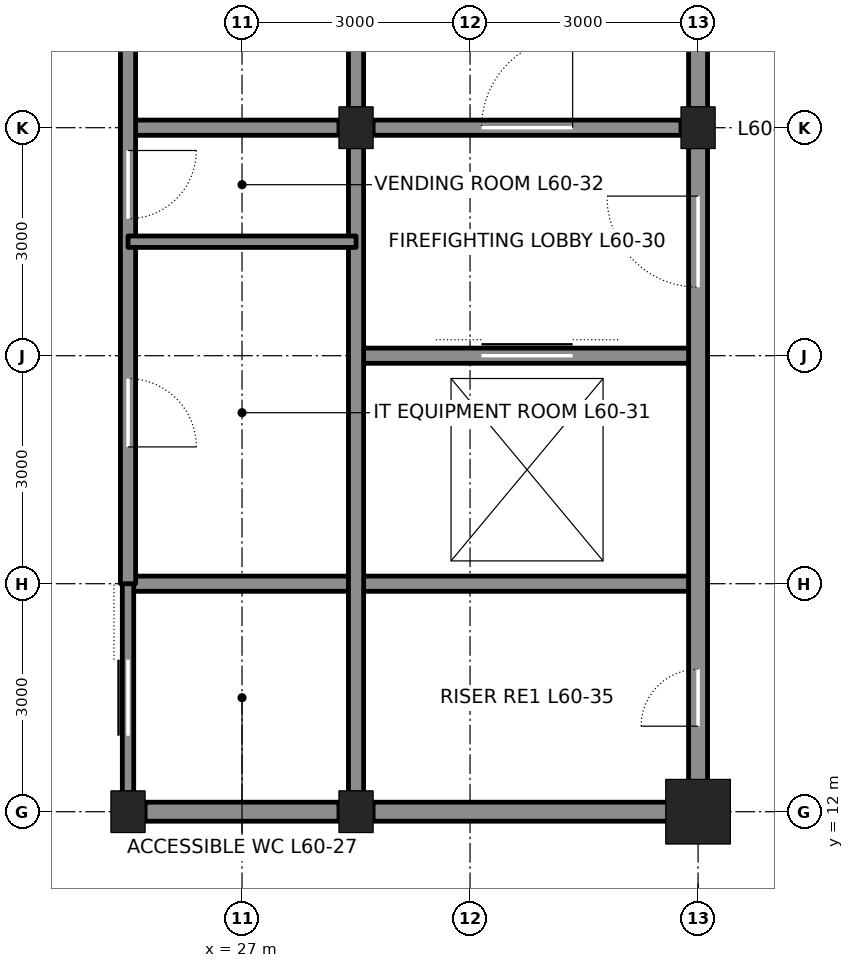
"""IFC4 building model, lengths in metres.
Left out: names, types, materials, properties, quantities, classifications, styles, units other than length and angle.
Written with IfcOpenShell. Run it as: python <this file> out.ifc"""

import sys

from ifc_helpers import new_model, si_unit, direction, frame, frame_2d, origin, origin_2d, place, context, subcontext, project, spatial, rectangle, hollow_rectangle, i_section, extrude, element, fill, save


model = new_model("IFC4")
c1 = context("Model", 3, precision=1e-05, world=origin(), true_north=direction((0.0, 1.0)))
c2 = subcontext(c1, "Body", "Model", "MODEL_VIEW")
j1 = project(units=[si_unit("LENGTHUNIT", "METRE"), si_unit("PLANEANGLEUNIT", "RADIAN")], contexts=[c1])
p1 = place(None, origin())
s1 = spatial("IfcSite", under=j1, at=p1, CompositionType="ELEMENT")
p2 = place(p1, origin())
s2 = spatial("IfcBuilding", under=s1, at=p2, CompositionType="ELEMENT")
p3 = place(p2, frame((0.0, 0.0, 270.6)))
s3 = spatial("IfcBuildingStorey", under=s2, at=p3, CompositionType="ELEMENT", Elevation=270.6)
for number, where, z_axis, x_axis in (
    (1, (25.5, 12.0, 0.0), (0.0, 0.0, 1.0), (1.0, 0.0, 0.0)),
    (2, (28.5, 12.0, 0.0), (0.0, 0.0, 1.0), (1.0, 0.0, 0.0)),
):
    element("IfcColumn", number, at=place(p3, frame(where, z_axis=z_axis, x_axis=x_axis)), inside=s3, PredefinedType="COLUMN", context=c2, shape_type="SweptSolid", body=[
        extrude(i_section(OverallWidth=0.449, OverallDepth=0.549, WebThickness=0.072, FlangeThickness=0.115, at=origin_2d()), origin(), (0.0, 0.0, 1.0), 4.2),
    ])
p4 = place(p3, frame((33.0, 12.0, 0.0), z_axis=(0.0, 0.0, 1.0), x_axis=(1.0, 0.0, 0.0)))
e3 = element("IfcColumn", 3, at=p4, inside=s3, PredefinedType="COLUMN", context=c2, shape_type="SweptSolid", body=[
    extrude(hollow_rectangle(XDim=0.85, YDim=0.85, WallThickness=0.085, at=origin_2d()), origin(), (0.0, 0.0, 1.0), 4.2),
])
for number, where, z_axis, x_axis in (
    (4, (33.0, 21.0, 0.0), (0.0, 0.0, 1.0), (1.0, 0.0, 0.0)),
    (5, (28.5, 21.0, 0.0), (0.0, 0.0, 1.0), (1.0, 0.0, 0.0)),
):
    element("IfcColumn", number, at=place(p3, frame(where, z_axis=z_axis, x_axis=x_axis)), inside=s3, PredefinedType="COLUMN", context=c2, shape_type="SweptSolid", body=[
        extrude(i_section(OverallWidth=0.449, OverallDepth=0.549, WebThickness=0.072, FlangeThickness=0.115, at=origin_2d()), origin(), (0.0, 0.0, 1.0), 4.2),
    ])
p5 = place(p3, frame((25.725, 12.0, 0.0), z_axis=(0.0, 0.0, 1.0), x_axis=(1.0, 0.0, 0.0)))
e6 = element("IfcWall", 6, at=p5, inside=s3, PredefinedType="SOLIDWALL", context=c2, shape_type="SweptSolid", body=[
    extrude(rectangle(XDim=2.55, YDim=0.25, at=frame_2d((1.275, 0.0))), origin(), (0.0, 0.0, 1.0), 3.181),
])
p6 = place(p3, frame((28.725, 12.0, 0.0), z_axis=(0.0, 0.0, 1.0), x_axis=(1.0, 0.0, 0.0)))
e7 = element("IfcWall", 7, at=p6, inside=s3, PredefinedType="SOLIDWALL", context=c2, shape_type="SweptSolid", body=[
    extrude(rectangle(XDim=4.025, YDim=0.25, at=frame_2d((2.013, 0.0))), origin(), (0.0, 0.0, 1.0), 3.181),
])
p7 = place(p3, frame((25.5, 15.0, 0.0), z_axis=(0.0, 0.0, 1.0), x_axis=(1.0, 0.0, 0.0)))
e8 = element("IfcWall", 8, at=p7, inside=s3, PredefinedType="SOLIDWALL", context=c2, shape_type="SweptSolid", body=[
    extrude(rectangle(XDim=7.5, YDim=0.2, at=frame_2d((3.75, 0.0))), origin(), (0.0, 0.0, 1.0), 4.04),
])
p8 = place(p3, frame((28.5, 18.0, 0.0), z_axis=(0.0, 0.0, 1.0), x_axis=(1.0, 0.0, 0.0)))
e9 = element("IfcWall", 9, at=p8, inside=s3, PredefinedType="SOLIDWALL", context=c2, shape_type="SweptSolid", body=[
    extrude(rectangle(XDim=4.5, YDim=0.2, at=frame_2d((2.25, 0.0))), origin(), (0.0, 0.0, 1.0), 4.04),
])
p9 = place(p8, frame((1.65, 0.0, 0.0)))
e10 = element("IfcOpeningElement", 10, at=p9, cuts=e9, PredefinedType="OPENING", context=c2, shape_type="SweptSolid", body=[
    extrude(rectangle(XDim=1.2, YDim=2.1, at=frame_2d((0.6, 1.05))), frame((0.0, 0.11, 0.0), z_axis=(0.0, -1.0, 0.0), x_axis=(1.0, 0.0, 0.0)), (0.0, 0.0, 1.0), 0.22),
])
p10 = place(p3, frame((25.5, 21.0, 0.0), z_axis=(0.0, 0.0, 1.0), x_axis=(1.0, 0.0, 0.0)))
e11 = element("IfcWall", 11, at=p10, inside=s3, PredefinedType="SOLIDWALL", context=c2, shape_type="SweptSolid", body=[
    extrude(rectangle(XDim=2.775, YDim=0.2, at=frame_2d((1.388, 0.0))), origin(), (0.0, 0.0, 1.0), 3.09),
])
p11 = place(p3, frame((28.725, 21.0, 0.0), z_axis=(0.0, 0.0, 1.0), x_axis=(1.0, 0.0, 0.0)))
e12 = element("IfcWall", 12, at=p11, inside=s3, PredefinedType="SOLIDWALL", context=c2, shape_type="SweptSolid", body=[
    extrude(rectangle(XDim=4.05, YDim=0.2, at=frame_2d((2.025, 0.0))), origin(), (0.0, 0.0, 1.0), 3.09),
])
p12 = place(p11, frame((1.425, 0.0, 0.0)))
e13 = element("IfcOpeningElement", 13, at=p12, cuts=e12, PredefinedType="OPENING", context=c2, shape_type="SweptSolid", body=[
    extrude(rectangle(XDim=1.2, YDim=2.1, at=frame_2d((0.6, 1.05))), frame((0.0, 0.11, 0.0), z_axis=(0.0, -1.0, 0.0), x_axis=(1.0, 0.0, 0.0)), (0.0, 0.0, 1.0), 0.22),
])
p13 = place(p3, frame((25.5, 12.25, 0.0), z_axis=(0.0, 0.0, 1.0), x_axis=(0.0, 1.0, 0.0)))
e14 = element("IfcWall", 14, at=p13, inside=s3, PredefinedType="PARTITIONING", context=c2, shape_type="SweptSolid", body=[
    extrude(rectangle(XDim=2.75, YDim=0.15, at=frame_2d((1.375, 0.0))), origin(), (0.0, 0.0, 1.0), 3.064),
])
p14 = place(p13, frame((0.75, 0.0, 0.0)))
e15 = element("IfcOpeningElement", 15, at=p14, cuts=e14, PredefinedType="OPENING", context=c2, shape_type="SweptSolid", body=[
    extrude(rectangle(XDim=1.0, YDim=2.1, at=frame_2d((0.5, 1.05))), frame((0.0, 0.085, 0.0), z_axis=(0.0, -1.0, 0.0), x_axis=(1.0, 0.0, 0.0)), (0.0, 0.0, 1.0), 0.17),
])
p15 = place(p3, frame((25.5, 15.0, 0.0), z_axis=(0.0, 0.0, 1.0), x_axis=(0.0, 1.0, 0.0)))
e16 = element("IfcWall", 16, at=p15, inside=s3, PredefinedType="SOLIDWALL", context=c2, shape_type="SweptSolid", body=[
    extrude(rectangle(XDim=12.0, YDim=0.2, at=frame_2d((6.0, 0.0))), origin(), (0.0, 0.0, 1.0), 3.064),
])
p16 = place(p15, frame((1.8, 0.0, 0.0)))
e17 = element("IfcOpeningElement", 17, at=p16, cuts=e16, PredefinedType="OPENING", context=c2, shape_type="SweptSolid", body=[
    extrude(rectangle(XDim=0.9, YDim=2.1, at=frame_2d((0.45, 1.05))), frame((0.0, 0.11, 0.0), z_axis=(0.0, -1.0, 0.0), x_axis=(1.0, 0.0, 0.0)), (0.0, 0.0, 1.0), 0.22),
])
p17 = place(p15, frame((4.8, 0.0, 0.0)))
e18 = element("IfcOpeningElement", 18, at=p17, cuts=e16, PredefinedType="OPENING", context=c2, shape_type="SweptSolid", body=[
    extrude(rectangle(XDim=0.9, YDim=2.1, at=frame_2d((0.45, 1.05))), frame((0.0, 0.11, 0.0), z_axis=(0.0, -1.0, 0.0), x_axis=(1.0, 0.0, 0.0)), (0.0, 0.0, 1.0), 0.22),
])
p18 = place(p3, frame((28.5, 12.25, 0.0), z_axis=(0.0, 0.0, 1.0), x_axis=(0.0, 1.0, 0.0)))
e19 = element("IfcWall", 19, at=p18, inside=s3, PredefinedType="SOLIDWALL", context=c2, shape_type="SweptSolid", body=[
    extrude(rectangle(XDim=8.5, YDim=0.2, at=frame_2d((4.25, 0.0))), origin(), (0.0, 0.0, 1.0), 3.113),
])
p19 = place(p3, frame((28.5, 21.25, 0.0), z_axis=(0.0, 0.0, 1.0), x_axis=(0.0, 1.0, 0.0)))
e20 = element("IfcWall", 20, at=p19, inside=s3, PredefinedType="SOLIDWALL", context=c2, shape_type="SweptSolid", body=[
    extrude(rectangle(XDim=2.5, YDim=0.2, at=frame_2d((1.25, 0.0))), origin(), (0.0, 0.0, 1.0), 3.113),
])
p20 = place(p3, frame((33.0, 12.25, 0.0), z_axis=(0.0, 0.0, 1.0), x_axis=(0.0, 1.0, 0.0)))
e21 = element("IfcWall", 21, at=p20, inside=s3, PredefinedType="SOLIDWALL", context=c2, shape_type="SweptSolid", body=[
    extrude(rectangle(XDim=8.5, YDim=0.25, at=frame_2d((4.25, 0.0))), origin(), (0.0, 0.0, 1.0), 3.113),
])
p21 = place(p20, frame((6.65, 0.0, 0.0)))
e22 = element("IfcOpeningElement", 22, at=p21, cuts=e21, PredefinedType="OPENING", context=c2, shape_type="SweptSolid", body=[
    extrude(rectangle(XDim=1.2, YDim=2.1, at=frame_2d((0.6, 1.05))), frame((0.0, 0.135, 0.0), z_axis=(0.0, -1.0, 0.0), x_axis=(1.0, 0.0, 0.0)), (0.0, 0.0, 1.0), 0.27),
])
p22 = place(p20, frame((0.875, 0.0, 0.0)))
e23 = element("IfcOpeningElement", 23, at=p22, cuts=e21, PredefinedType="OPENING", context=c2, shape_type="SweptSolid", body=[
    extrude(rectangle(XDim=0.75, YDim=2.1, at=frame_2d((0.375, 1.05))), frame((0.0, 0.135, 0.0), z_axis=(0.0, -1.0, 0.0), x_axis=(1.0, 0.0, 0.0)), (0.0, 0.0, 1.0), 0.27),
])
p23 = place(p3, frame((33.0, 21.25, 0.0), z_axis=(0.0, 0.0, 1.0), x_axis=(0.0, 1.0, 0.0)))
e24 = element("IfcWall", 24, at=p23, inside=s3, PredefinedType="SOLIDWALL", context=c2, shape_type="SweptSolid", body=[
    extrude(rectangle(XDim=2.5, YDim=0.25, at=frame_2d((1.25, 0.0))), origin(), (0.0, 0.0, 1.0), 3.113),
])
p24 = place(p3, frame((25.5, 19.5, 0.0), z_axis=(0.0, 0.0, 1.0), x_axis=(1.0, 0.0, 0.0)))
e25 = element("IfcWall", 25, at=p24, inside=s3, PredefinedType="PARTITIONING", context=c2, shape_type="SweptSolid", body=[
    extrude(rectangle(XDim=3.0, YDim=0.15, at=frame_2d((1.5, 0.0))), origin(), (0.0, 0.0, 1.0), 4.04),
])
p25 = place(p12, origin())
e26 = element("IfcDoor", 26, at=p25, inside=s3, OperationType="SINGLE_SWING_RIGHT", PredefinedType="DOOR", context=c2, shape_type="SweptSolid", body=[
    extrude(rectangle(XDim=1.2, YDim=2.1, at=frame_2d((0.6, 1.05))), frame((0.0, 0.025, 0.0), z_axis=(0.0, -1.0, 0.0), x_axis=(1.0, 0.0, 0.0)), (0.0, 0.0, 1.0), 0.05),
])
fill(e13, e26)
p26 = place(p21, origin())
e27 = element("IfcDoor", 27, at=p26, inside=s3, OperationType="SINGLE_SWING_RIGHT", PredefinedType="DOOR", context=c2, shape_type="SweptSolid", body=[
    extrude(rectangle(XDim=1.2, YDim=2.1, at=frame_2d((0.6, 1.05))), frame((0.0, 0.025, 0.0), z_axis=(0.0, -1.0, 0.0), x_axis=(1.0, 0.0, 0.0)), (0.0, 0.0, 1.0), 0.05),
])
fill(e22, e27)
p27 = place(p9, origin())
e28 = element("IfcDoor", 28, at=p27, inside=s3, OperationType="DOUBLE_DOOR_SLIDING", PredefinedType="DOOR", context=c2, shape_type="SweptSolid", body=[
    extrude(rectangle(XDim=1.2, YDim=2.1, at=frame_2d((0.6, 1.05))), frame((0.0, 0.025, 0.0), z_axis=(0.0, -1.0, 0.0), x_axis=(1.0, 0.0, 0.0)), (0.0, 0.0, 1.0), 0.05),
])
fill(e10, e28)
p28 = place(p22, origin())
e29 = element("IfcDoor", 29, at=p28, inside=s3, OperationType="SINGLE_SWING_LEFT", PredefinedType="DOOR", context=c2, shape_type="SweptSolid", body=[
    extrude(rectangle(XDim=0.75, YDim=2.1, at=frame_2d((0.375, 1.05))), frame((0.0, 0.025, 0.0), z_axis=(0.0, -1.0, 0.0), x_axis=(1.0, 0.0, 0.0)), (0.0, 0.0, 1.0), 0.05),
])
fill(e23, e29)
p29 = place(p14, origin())
e30 = element("IfcDoor", 30, at=p29, inside=s3, OperationType="SLIDING_TO_LEFT", PredefinedType="DOOR", context=c2, shape_type="SweptSolid", body=[
    extrude(rectangle(XDim=1.0, YDim=2.1, at=frame_2d((0.5, 1.05))), frame((0.0, 0.025, 0.0), z_axis=(0.0, -1.0, 0.0), x_axis=(1.0, 0.0, 0.0)), (0.0, 0.0, 1.0), 0.05),
])
fill(e15, e30)
p30 = place(p16, frame((0.9, 0.0, 0.0), z_axis=(0.0, 0.0, 1.0), x_axis=(-1.0, 0.0, 0.0)))
e31 = element("IfcDoor", 31, at=p30, inside=s3, OperationType="SINGLE_SWING_RIGHT", PredefinedType="DOOR", context=c2, shape_type="SweptSolid", body=[
    extrude(rectangle(XDim=0.9, YDim=2.1, at=frame_2d((0.45, 1.05))), frame((0.0, 0.025, 0.0), z_axis=(0.0, -1.0, 0.0), x_axis=(1.0, 0.0, 0.0)), (0.0, 0.0, 1.0), 0.05),
])
fill(e17, e31)
p31 = place(p17, frame((0.9, 0.0, 0.0), z_axis=(0.0, 0.0, 1.0), x_axis=(-1.0, 0.0, 0.0)))
e32 = element("IfcDoor", 32, at=p31, inside=s3, OperationType="SINGLE_SWING_LEFT", PredefinedType="DOOR", context=c2, shape_type="SweptSolid", body=[
    extrude(rectangle(XDim=0.9, YDim=2.1, at=frame_2d((0.45, 1.05))), frame((0.0, 0.025, 0.0), z_axis=(0.0, -1.0, 0.0), x_axis=(1.0, 0.0, 0.0)), (0.0, 0.0, 1.0), 0.05),
])
fill(e18, e32)
save(model, sys.argv[1])
